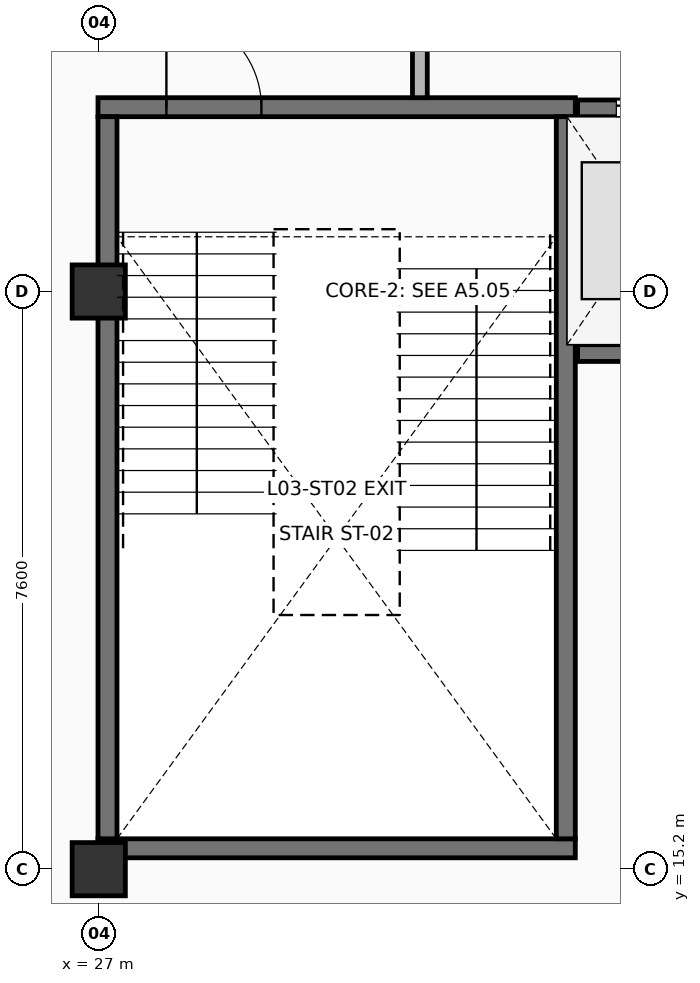
"""IFC4 building model, lengths in metres.
Left out: names, types, materials, properties, quantities, classifications, styles, units other than length and angle.
Written with IfcOpenShell. Run it as: python <this file> out.ifc"""

import sys

from ifc_helpers import new_model, si_unit, direction, frame, frame_2d, origin, origin_2d, place, context, subcontext, project, spatial, rectangle, extrude, element, fill, save


model = new_model("IFC4")
c1 = context("Model", 3, precision=1e-05, world=origin(), true_north=direction((0.0, 1.0)))
c2 = subcontext(c1, "Body", "Model", "MODEL_VIEW")
j1 = project(units=[si_unit("LENGTHUNIT", "METRE"), si_unit("PLANEANGLEUNIT", "RADIAN")], contexts=[c1])
p1 = place(None, origin())
s1 = spatial("IfcSite", under=j1, at=p1, CompositionType="ELEMENT")
p2 = place(p1, origin())
s2 = spatial("IfcBuilding", under=s1, at=p2, CompositionType="ELEMENT")
p3 = place(p2, frame((0.0, 0.0, 10.5)))
s3 = spatial("IfcBuildingStorey", under=s2, at=p3, CompositionType="ELEMENT", Elevation=10.5)
for number, where, z_axis, x_axis in (
    (1, (27.0, 15.2, 0.0), (0.0, 0.0, 1.0), (1.0, 0.0, 0.0)),
    (2, (27.0, 22.8, 0.0), (0.0, 0.0, 1.0), (1.0, 0.0, 0.0)),
):
    element("IfcColumn", number, at=place(p3, frame(where, z_axis=z_axis, x_axis=x_axis)), inside=s3, PredefinedType="COLUMN", context=c2, shape_type="SweptSolid", body=[
        extrude(rectangle(XDim=0.7, YDim=0.7, at=origin_2d()), origin(), (0.0, 0.0, 1.0), 4.8),
    ])
p4 = place(p3, frame((26.99, 15.475, 0.0), z_axis=(0.0, 0.0, 1.0), x_axis=(1.0, 0.0, 0.0)))
e3 = element("IfcWall", 3, at=p4, inside=s3, PredefinedType="SHEAR", context=c2, shape_type="SweptSolid", body=[
    extrude(rectangle(XDim=6.28, YDim=0.25, at=frame_2d((3.14, 0.0))), origin(), (0.0, 0.0, 1.0), 4.575),
])
p5 = place(p3, frame((26.99, 25.225, 0.0), z_axis=(0.0, 0.0, 1.0), x_axis=(1.0, 0.0, 0.0)))
e4 = element("IfcWall", 4, at=p5, inside=s3, PredefinedType="SHEAR", context=c2, shape_type="SweptSolid", body=[
    extrude(rectangle(XDim=6.28, YDim=0.25, at=frame_2d((3.14, 0.0))), origin(), (0.0, 0.0, 1.0), 4.575),
])
p6 = place(p5, frame((0.9, 0.0, 0.0)))
e5 = element("IfcOpeningElement", 5, at=p6, cuts=e4, PredefinedType="OPENING", context=c2, shape_type="SweptSolid", body=[
    extrude(rectangle(XDim=1.25, YDim=2.2, at=frame_2d((0.625, 1.1))), frame((0.0, 0.135, 0.0), z_axis=(0.0, -1.0, 0.0), x_axis=(1.0, 0.0, 0.0)), (0.0, 0.0, 1.0), 0.27),
])
for number, where, z_axis, x_axis in (
    (6, (27.115, 15.6, 0.0), (0.0, 0.0, 1.0), (0.0, 1.0, 0.0)),
    (7, (33.145, 15.6, 0.0), (0.0, 0.0, 1.0), (0.0, 1.0, 0.0)),
):
    element("IfcWall", number, at=place(p3, frame(where, z_axis=z_axis, x_axis=x_axis)), inside=s3, PredefinedType="SHEAR", context=c2, shape_type="SweptSolid", body=[
        extrude(rectangle(XDim=9.5, YDim=0.25, at=frame_2d((4.75, 0.0))), origin(), (0.0, 0.0, 1.0), 4.575),
    ])
p7 = place(p3, frame((33.3, 21.99, 0.0), z_axis=(0.0, 0.0, 1.0), x_axis=(1.0, 0.0, 0.0)))
e8 = element("IfcWall", 8, at=p7, inside=s3, PredefinedType="SHEAR", context=c2, shape_type="SweptSolid", body=[
    extrude(rectangle(XDim=2.12, YDim=0.22, at=frame_2d((1.06, 0.0))), origin(), (0.0, 0.0, 1.0), 4.575),
])
p8 = place(p3, frame((33.3, 25.21, 0.0), z_axis=(0.0, 0.0, 1.0), x_axis=(1.0, 0.0, 0.0)))
e9 = element("IfcWall", 9, at=p8, inside=s3, PredefinedType="SHEAR", context=c2, shape_type="SweptSolid", body=[
    extrude(rectangle(XDim=2.12, YDim=0.22, at=frame_2d((1.06, 0.0))), origin(), (0.0, 0.0, 1.0), 4.575),
])
p9 = place(p8, frame((0.51, 0.0, 0.0)))
e10 = element("IfcOpeningElement", 10, at=p9, cuts=e9, PredefinedType="OPENING", context=c2, shape_type="SweptSolid", body=[
    extrude(rectangle(XDim=1.1, YDim=2.15, at=frame_2d((0.55, 1.075))), frame((0.0, 0.12, 0.0), z_axis=(0.0, -1.0, 0.0), x_axis=(1.0, 0.0, 0.0)), (0.0, 0.0, 1.0), 0.24),
])
p10 = place(p3, frame((31.225, 25.35, 0.0), z_axis=(0.0, 0.0, 1.0), x_axis=(0.0, 1.0, 0.0)))
e11 = element("IfcWall", 11, at=p10, inside=s3, PredefinedType="PARTITIONING", context=c2, shape_type="SweptSolid", body=[
    extrude(rectangle(XDim=4.5, YDim=0.195, at=frame_2d((2.25, 0.0))), origin(), (0.0, 0.0, 1.0), 4.575),
])
p11 = place(p10, frame((1.7, 0.0, 0.0)))
e12 = element("IfcOpeningElement", 12, at=p11, cuts=e11, PredefinedType="OPENING", context=c2, shape_type="SweptSolid", body=[
    extrude(rectangle(XDim=1.1, YDim=2.15, at=frame_2d((0.55, 1.075))), frame((0.0, 0.107, 0.0), z_axis=(0.0, -1.0, 0.0), x_axis=(1.0, 0.0, 0.0)), (0.0, 0.0, 1.0), 0.215),
])
p12 = place(p6, origin())
e13 = element("IfcDoor", 13, at=p12, inside=s3, OperationType="SINGLE_SWING_LEFT", PredefinedType="DOOR", context=c2, shape_type="SweptSolid", body=[
    extrude(rectangle(XDim=1.25, YDim=2.2, at=frame_2d((0.625, 1.1))), frame((0.0, 0.025, 0.0), z_axis=(0.0, -1.0, 0.0), x_axis=(1.0, 0.0, 0.0)), (0.0, 0.0, 1.0), 0.05),
])
fill(e5, e13)
p13 = place(p9, origin())
e14 = element("IfcDoor", 14, at=p13, inside=s3, OperationType="DOUBLE_DOOR_SLIDING", PredefinedType="DOOR", context=c2, shape_type="SweptSolid", body=[
    extrude(rectangle(XDim=1.1, YDim=2.15, at=frame_2d((0.55, 1.075))), frame((0.0, 0.025, 0.0), z_axis=(0.0, -1.0, 0.0), x_axis=(1.0, 0.0, 0.0)), (0.0, 0.0, 1.0), 0.05),
])
fill(e10, e14)
save(model, sys.argv[1])
